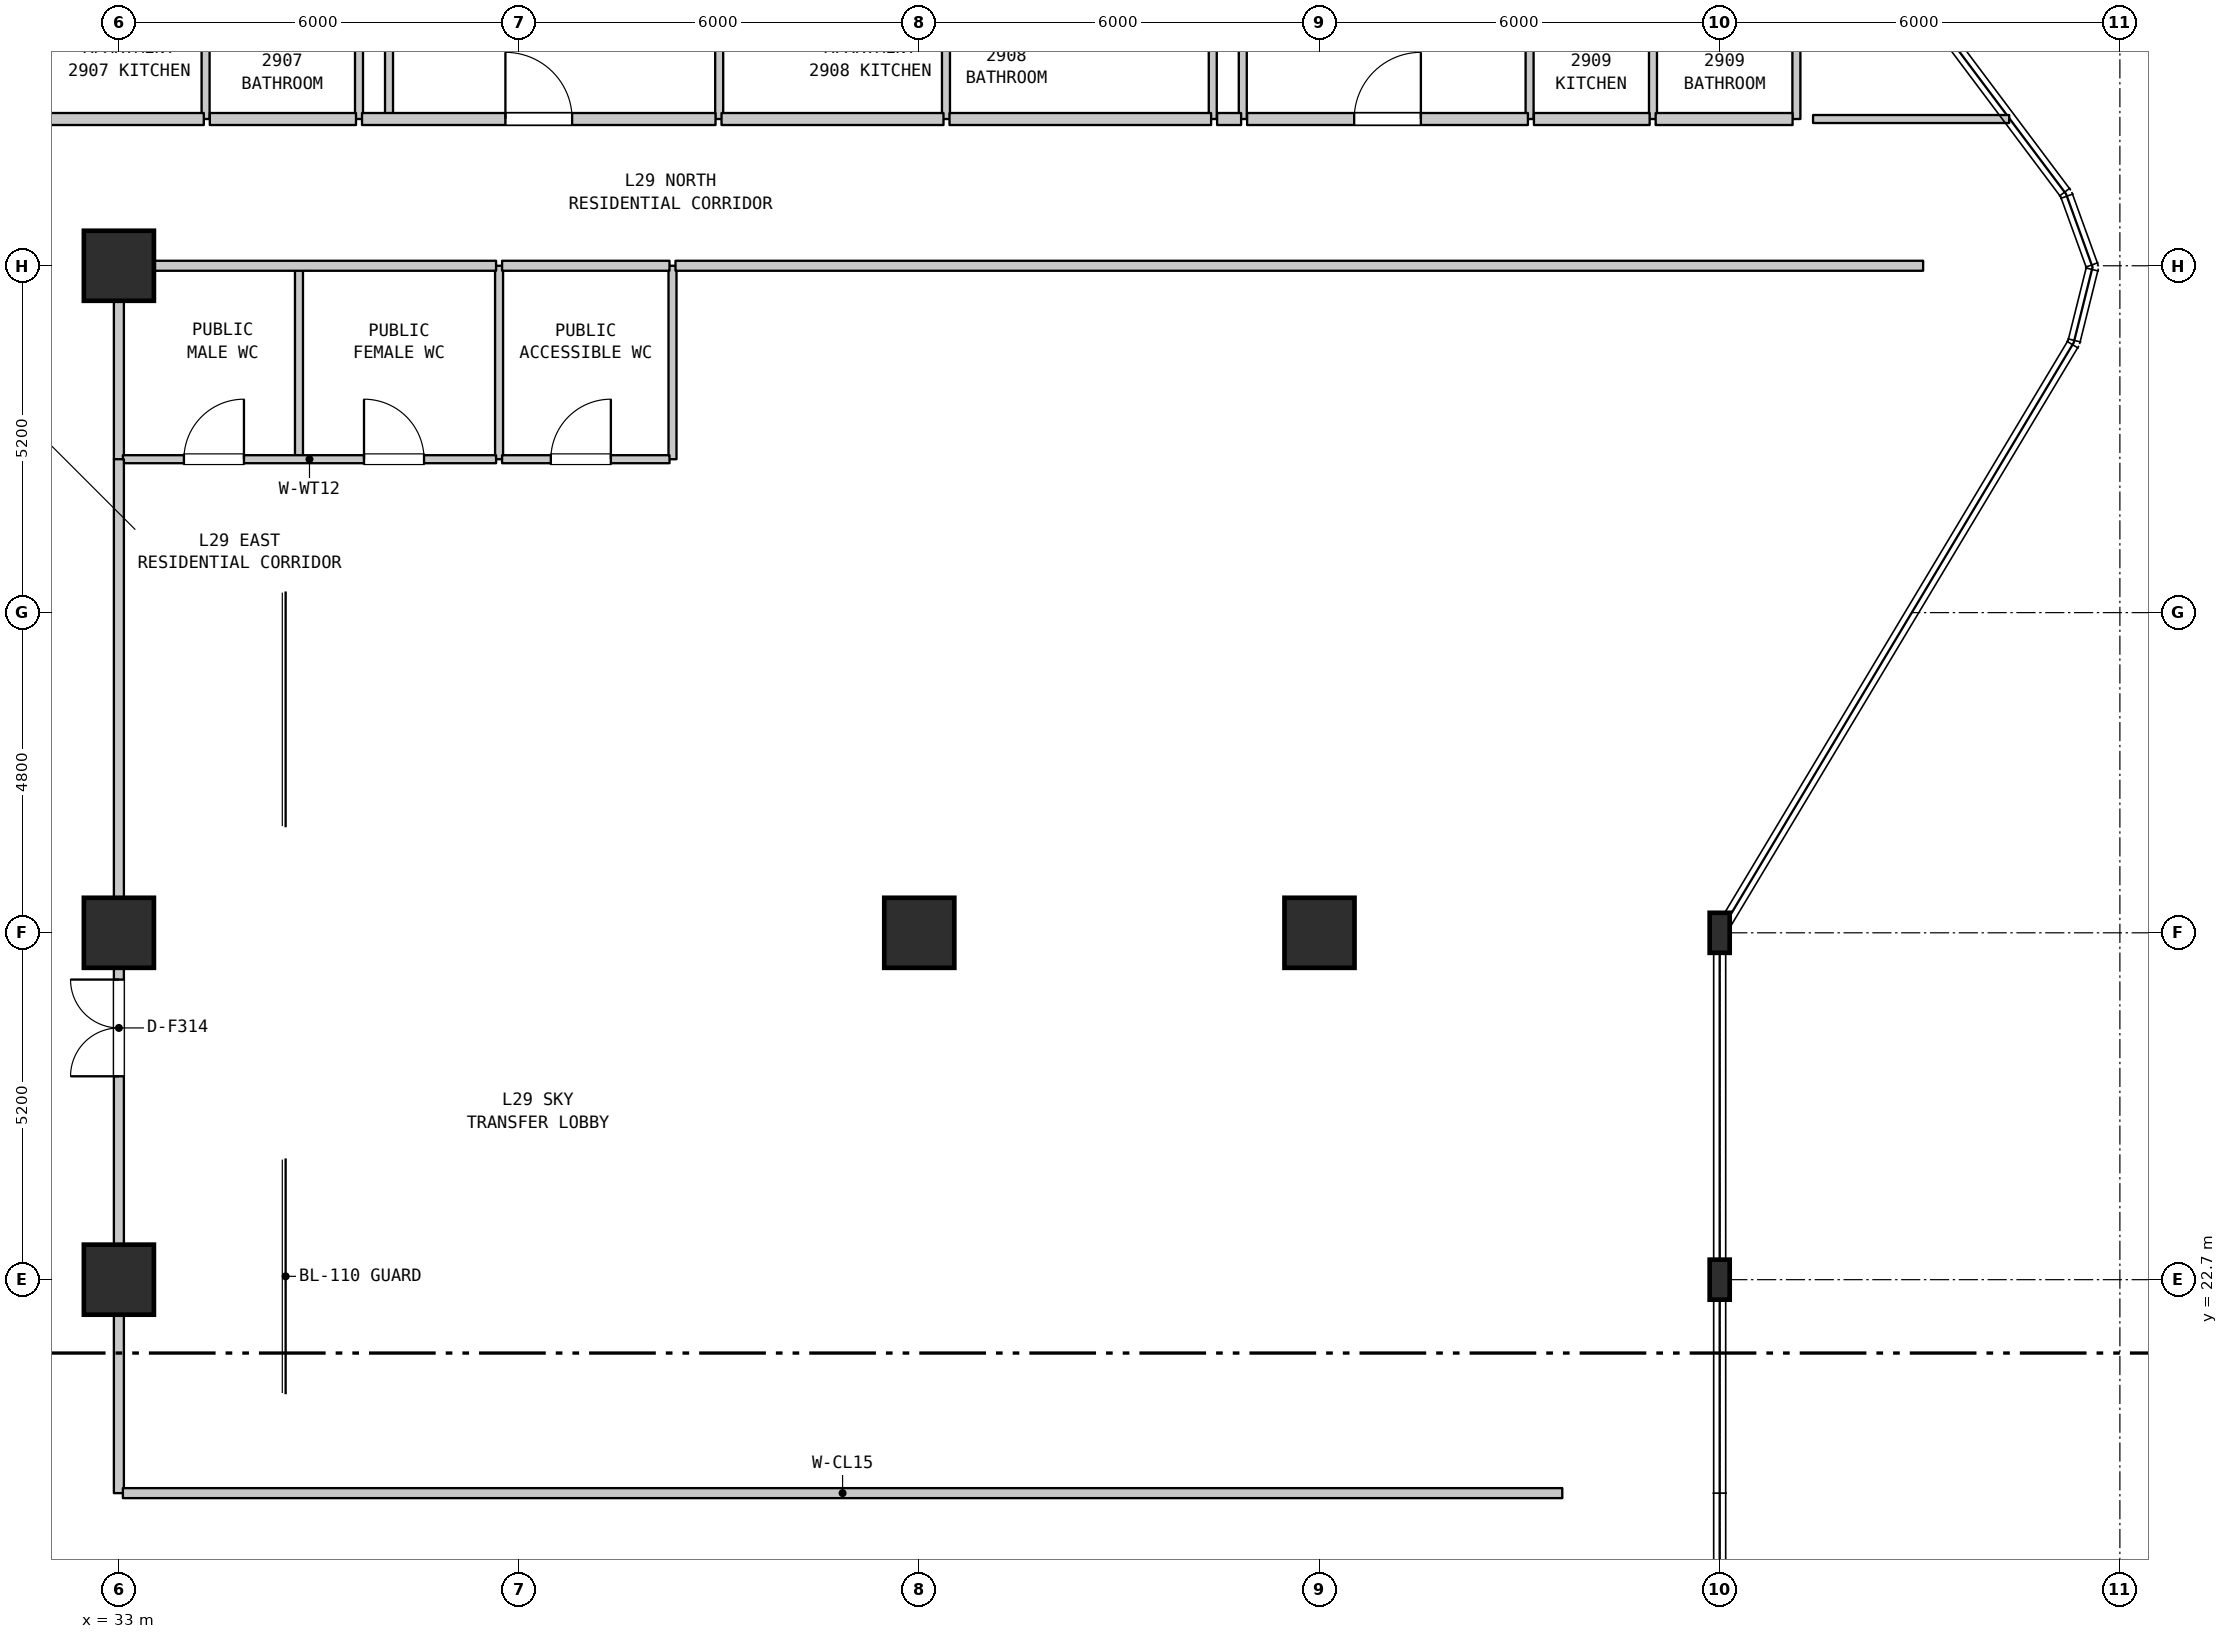
"""IFC4 building model, lengths in metres.
Left out: names, types, materials, properties, quantities, classifications, styles, units other than length and angle.
Written with IfcOpenShell. Run it as: python <this file> out.ifc"""

import sys

from ifc_helpers import new_model, si_unit, direction, frame, frame_2d, origin, origin_2d, place, context, subcontext, project, spatial, rectangle, i_section, extrude, element, fill, save


model = new_model("IFC4")
c1 = context("Model", 3, precision=1e-05, world=origin(), true_north=direction((0.0, 1.0)))
c2 = subcontext(c1, "Body", "Model", "MODEL_VIEW")
j1 = project(units=[si_unit("LENGTHUNIT", "METRE"), si_unit("PLANEANGLEUNIT", "RADIAN")], contexts=[c1])
p1 = place(None, origin())
s1 = spatial("IfcSite", under=j1, at=p1, CompositionType="ELEMENT")
p2 = place(p1, origin())
s2 = spatial("IfcBuilding", under=s1, at=p2, CompositionType="ELEMENT")
p3 = place(p2, frame((0.0, 0.0, 120.5)))
s3 = spatial("IfcBuildingStorey", under=s2, at=p3, CompositionType="ELEMENT", Elevation=120.5)
for number, where, z_axis, x_axis in (
    (1, (33.0, 22.7, 0.0), (0.0, 0.0, 1.0), (1.0, 0.0, 0.0)),
    (2, (33.0, 27.9, 0.0), (0.0, 0.0, 1.0), (1.0, 0.0, 0.0)),
    (3, (33.0, 37.9, 0.0), (0.0, 0.0, 1.0), (1.0, 0.0, 0.0)),
    (4, (45.0, 27.9, 0.0), (0.0, 0.0, 1.0), (1.0, 0.0, 0.0)),
    (5, (51.0, 27.9, 0.0), (0.0, 0.0, 1.0), (1.0, 0.0, 0.0)),
):
    element("IfcColumn", number, at=place(p3, frame(where, z_axis=z_axis, x_axis=x_axis)), inside=s3, PredefinedType="COLUMN", context=c2, shape_type="SweptSolid", body=[
        extrude(rectangle(XDim=1.05, YDim=1.05, at=origin_2d()), origin(), (0.0, 0.0, 1.0), 4.8),
    ])
for number, where, z_axis, x_axis in (
    (6, (57.0, 22.7, 0.0), (0.0, 0.0, 1.0), (1.0, 0.0, 0.0)),
    (7, (57.0, 27.9, 0.0), (0.0, 0.0, 1.0), (1.0, 0.0, 0.0)),
):
    element("IfcColumn", number, at=place(p3, frame(where, z_axis=z_axis, x_axis=x_axis)), inside=s3, PredefinedType="COLUMN", context=c2, shape_type="SweptSolid", body=[
        extrude(i_section(OverallWidth=0.3, OverallDepth=0.6, WebThickness=0.015, FlangeThickness=0.03, FilletRadius=0.027, at=origin_2d()), origin(), (0.0, 0.0, 1.0), 4.8),
    ])
p4 = place(p3, frame((33.0, 19.5, 0.0), z_axis=(0.0, 0.0, 1.0), x_axis=(0.0, 1.0, 0.0)))
e8 = element("IfcWall", 8, at=p4, inside=s3, PredefinedType="STANDARD", context=c2, shape_type="SweptSolid", body=[
    extrude(rectangle(XDim=8.4, YDim=0.15, at=frame_2d((4.2, 0.0))), origin(), (0.0, 0.0, 1.0), 4.03),
])
p5 = place(p4, frame((6.249, 0.0, 0.0)))
e9 = element("IfcOpeningElement", 9, at=p5, cuts=e8, PredefinedType="OPENING", context=c2, shape_type="SweptSolid", body=[
    extrude(rectangle(XDim=1.45, YDim=2.2, at=frame_2d((0.725, 1.1))), frame((0.0, 0.085, 0.0), z_axis=(0.0, -1.0, 0.0), x_axis=(1.0, 0.0, 0.0)), (0.0, 0.0, 1.0), 0.17),
])
p6 = place(p3, frame((33.0, 35.0, 0.0), z_axis=(0.0, 0.0, 1.0), x_axis=(0.0, 1.0, 0.0)))
e10 = element("IfcWall", 10, at=p6, inside=s3, PredefinedType="STANDARD", context=c2, shape_type="SweptSolid", body=[
    extrude(rectangle(XDim=2.9, YDim=0.15, at=frame_2d((1.45, 0.0))), origin(), (0.0, 0.0, 1.0), 3.98),
])
p7 = place(p3, frame((34.3, 40.1, 0.0), z_axis=(0.0, 0.0, 1.0), x_axis=(0.0, 1.0, 0.0)))
e11 = element("IfcWall", 11, at=p7, inside=s3, PredefinedType="PARTITIONING", context=c2, shape_type="SweptSolid", body=[
    extrude(rectangle(XDim=2.3, YDim=0.12, at=frame_2d((1.15, 0.0))), origin(), (0.0, 0.0, 1.0), 4.48),
])
p8 = place(p3, frame((35.7, 35.0, 0.0), z_axis=(0.0, 0.0, 1.0), x_axis=(0.0, 1.0, 0.0)))
e12 = element("IfcWall", 12, at=p8, inside=s3, PredefinedType="PARTITIONING", context=c2, shape_type="SweptSolid", body=[
    extrude(rectangle(XDim=2.9, YDim=0.12, at=frame_2d((1.45, 0.0))), origin(), (0.0, 0.0, 1.0), 4.48),
])
p9 = place(p3, frame((36.6, 40.1, 0.0), z_axis=(0.0, 0.0, 1.0), x_axis=(0.0, 1.0, 0.0)))
e13 = element("IfcWall", 13, at=p9, inside=s3, PredefinedType="PARTITIONING", context=c2, shape_type="SweptSolid", body=[
    extrude(rectangle(XDim=2.3, YDim=0.12, at=frame_2d((1.15, 0.0))), origin(), (0.0, 0.0, 1.0), 4.48),
])
p10 = place(p3, frame((37.05, 40.1, 0.0), z_axis=(0.0, 0.0, 1.0), x_axis=(0.0, 1.0, 0.0)))
e14 = element("IfcWall", 14, at=p10, inside=s3, PredefinedType="PARTITIONING", context=c2, shape_type="SweptSolid", body=[
    extrude(rectangle(XDim=2.05, YDim=0.12, at=frame_2d((1.025, 0.0))), origin(), (0.0, 0.0, 1.0), 4.48),
])
for number, where, z_axis, x_axis in (
    (15, (38.7, 35.0, 0.0), (0.0, 0.0, 1.0), (0.0, 1.0, 0.0)),
    (16, (41.3, 35.0, 0.0), (0.0, 0.0, 1.0), (0.0, 1.0, 0.0)),
):
    element("IfcWall", number, at=place(p3, frame(where, z_axis=z_axis, x_axis=x_axis)), inside=s3, PredefinedType="PARTITIONING", context=c2, shape_type="SweptSolid", body=[
        extrude(rectangle(XDim=2.9, YDim=0.12, at=frame_2d((1.45, 0.0))), origin(), (0.0, 0.0, 1.0), 4.48),
    ])
for number, where, z_axis, x_axis in (
    (17, (42.0, 40.1, 0.0), (0.0, 0.0, 1.0), (0.0, 1.0, 0.0)),
    (18, (45.4, 40.1, 0.0), (0.0, 0.0, 1.0), (0.0, 1.0, 0.0)),
    (19, (49.4, 40.1, 0.0), (0.0, 0.0, 1.0), (0.0, 1.0, 0.0)),
):
    element("IfcWall", number, at=place(p3, frame(where, z_axis=z_axis, x_axis=x_axis)), inside=s3, PredefinedType="PARTITIONING", context=c2, shape_type="SweptSolid", body=[
        extrude(rectangle(XDim=2.3, YDim=0.12, at=frame_2d((1.15, 0.0))), origin(), (0.0, 0.0, 1.0), 4.48),
    ])
p11 = place(p3, frame((49.85, 40.1, 0.0), z_axis=(0.0, 0.0, 1.0), x_axis=(0.0, 1.0, 0.0)))
e20 = element("IfcWall", 20, at=p11, inside=s3, PredefinedType="PARTITIONING", context=c2, shape_type="SweptSolid", body=[
    extrude(rectangle(XDim=5.35, YDim=0.12, at=frame_2d((2.675, 0.0))), origin(), (0.0, 0.0, 1.0), 4.48),
])
for number, where, z_axis, x_axis in (
    (21, (54.15, 40.1, 0.0), (0.0, 0.0, 1.0), (0.0, 1.0, 0.0)),
    (22, (56.0, 40.1, 0.0), (0.0, 0.0, 1.0), (0.0, 1.0, 0.0)),
    (23, (58.15, 40.1, 0.0), (0.0, 0.0, 1.0), (0.0, 1.0, 0.0)),
):
    element("IfcWall", number, at=place(p3, frame(where, z_axis=z_axis, x_axis=x_axis)), inside=s3, PredefinedType="PARTITIONING", context=c2, shape_type="SweptSolid", body=[
        extrude(rectangle(XDim=2.3, YDim=0.12, at=frame_2d((1.15, 0.0))), origin(), (0.0, 0.0, 1.0), 4.48),
    ])
p12 = place(p3, frame((33.06, 19.5, 0.0), z_axis=(0.0, 0.0, 1.0), x_axis=(1.0, 0.0, 0.0)))
e24 = element("IfcWall", 24, at=p12, inside=s3, PredefinedType="STANDARD", context=c2, shape_type="SweptSolid", body=[
    extrude(rectangle(XDim=21.58, YDim=0.15, at=frame_2d((10.79, 0.0))), origin(), (0.0, 0.0, 1.0), 4.48),
])
p13 = place(p3, frame((33.06, 35.0, 0.0), z_axis=(0.0, 0.0, 1.0), x_axis=(1.0, 0.0, 0.0)))
e25 = element("IfcWall", 25, at=p13, inside=s3, PredefinedType="PARTITIONING", context=c2, shape_type="SweptSolid", body=[
    extrude(rectangle(XDim=5.595, YDim=0.12, at=frame_2d((2.797, 0.0))), origin(), (0.0, 0.0, 1.0), 4.48),
])
p14 = place(p13, frame((0.915, 0.0, 0.0)))
e26 = element("IfcOpeningElement", 26, at=p14, cuts=e25, PredefinedType="OPENING", context=c2, shape_type="SweptSolid", body=[
    extrude(rectangle(XDim=0.9, YDim=2.1, at=frame_2d((0.45, 1.05))), frame((0.0, 0.07, 0.0), z_axis=(0.0, -1.0, 0.0), x_axis=(1.0, 0.0, 0.0)), (0.0, 0.0, 1.0), 0.14),
])
p15 = place(p13, frame((3.615, 0.0, 0.0)))
e27 = element("IfcOpeningElement", 27, at=p15, cuts=e25, PredefinedType="OPENING", context=c2, shape_type="SweptSolid", body=[
    extrude(rectangle(XDim=0.9, YDim=2.1, at=frame_2d((0.45, 1.05))), frame((0.0, 0.07, 0.0), z_axis=(0.0, -1.0, 0.0), x_axis=(1.0, 0.0, 0.0)), (0.0, 0.0, 1.0), 0.14),
])
p16 = place(p3, frame((38.745, 35.0, 0.0), z_axis=(0.0, 0.0, 1.0), x_axis=(1.0, 0.0, 0.0)))
e28 = element("IfcWall", 28, at=p16, inside=s3, PredefinedType="PARTITIONING", context=c2, shape_type="SweptSolid", body=[
    extrude(rectangle(XDim=2.51, YDim=0.12, at=frame_2d((1.255, 0.0))), origin(), (0.0, 0.0, 1.0), 4.48),
])
p17 = place(p16, frame((0.731, 0.0, 0.0)))
e29 = element("IfcOpeningElement", 29, at=p17, cuts=e28, PredefinedType="OPENING", context=c2, shape_type="SweptSolid", body=[
    extrude(rectangle(XDim=0.9, YDim=2.1, at=frame_2d((0.45, 1.05))), frame((0.0, 0.07, 0.0), z_axis=(0.0, -1.0, 0.0), x_axis=(1.0, 0.0, 0.0)), (0.0, 0.0, 1.0), 0.14),
])
p18 = place(p3, frame((33.06, 37.9, 0.0), z_axis=(0.0, 0.0, 1.0), x_axis=(1.0, 0.0, 0.0)))
e30 = element("IfcWall", 30, at=p18, inside=s3, PredefinedType="STANDARD", context=c2, shape_type="SweptSolid", body=[
    extrude(rectangle(XDim=5.595, YDim=0.15, at=frame_2d((2.797, 0.0))), origin(), (0.0, 0.0, 1.0), 4.48),
])
p19 = place(p3, frame((38.745, 37.9, 0.0), z_axis=(0.0, 0.0, 1.0), x_axis=(1.0, 0.0, 0.0)))
e31 = element("IfcWall", 31, at=p19, inside=s3, PredefinedType="STANDARD", context=c2, shape_type="SweptSolid", body=[
    extrude(rectangle(XDim=2.51, YDim=0.15, at=frame_2d((1.255, 0.0))), origin(), (0.0, 0.0, 1.0), 4.48),
])
p20 = place(p3, frame((41.345, 37.9, 0.0), z_axis=(0.0, 0.0, 1.0), x_axis=(1.0, 0.0, 0.0)))
e32 = element("IfcWall", 32, at=p20, inside=s3, PredefinedType="STANDARD", context=c2, shape_type="SweptSolid", body=[
    extrude(rectangle(XDim=18.705, YDim=0.15, at=frame_2d((9.353, 0.0))), origin(), (0.0, 0.0, 1.0), 4.48),
])
p21 = place(p3, frame((30.924, 40.1, 0.0), z_axis=(0.0, 0.0, 1.0), x_axis=(1.0, 0.0, 0.0)))
e33 = element("IfcWall", 33, at=p21, inside=s3, PredefinedType="STANDARD", context=c2, shape_type="SweptSolid", body=[
    extrude(rectangle(XDim=3.349, YDim=0.18, at=frame_2d((1.674, 0.0))), origin(), (0.0, 0.0, 1.0), 4.48),
])
p22 = place(p3, frame((34.363, 40.1, 0.0), z_axis=(0.0, 0.0, 1.0), x_axis=(1.0, 0.0, 0.0)))
e34 = element("IfcWall", 34, at=p22, inside=s3, PredefinedType="STANDARD", context=c2, shape_type="SweptSolid", body=[
    extrude(rectangle(XDim=2.192, YDim=0.18, at=frame_2d((1.096, 0.0))), origin(), (0.0, 0.0, 1.0), 4.48),
])
p23 = place(p3, frame((36.645, 40.1, 0.0), z_axis=(0.0, 0.0, 1.0), x_axis=(1.0, 0.0, 0.0)))
e35 = element("IfcWall", 35, at=p23, inside=s3, PredefinedType="STANDARD", context=c2, shape_type="SweptSolid", body=[
    extrude(rectangle(XDim=5.3, YDim=0.18, at=frame_2d((2.65, 0.0))), origin(), (0.0, 0.0, 1.0), 4.48),
])
p24 = place(p23, frame((2.15, 0.0, 0.0)))
e36 = element("IfcOpeningElement", 36, at=p24, cuts=e35, PredefinedType="OPENING", context=c2, shape_type="SweptSolid", body=[
    extrude(rectangle(XDim=1.0, YDim=2.15, at=frame_2d((0.5, 1.075))), frame((0.0, 0.1, 0.0), z_axis=(0.0, -1.0, 0.0), x_axis=(1.0, 0.0, 0.0)), (0.0, 0.0, 1.0), 0.2),
])
p25 = place(p3, frame((42.035, 40.1, 0.0), z_axis=(0.0, 0.0, 1.0), x_axis=(1.0, 0.0, 0.0)))
e37 = element("IfcWall", 37, at=p25, inside=s3, PredefinedType="STANDARD", context=c2, shape_type="SweptSolid", body=[
    extrude(rectangle(XDim=3.328, YDim=0.18, at=frame_2d((1.664, 0.0))), origin(), (0.0, 0.0, 1.0), 4.48),
])
p26 = place(p3, frame((45.453, 40.1, 0.0), z_axis=(0.0, 0.0, 1.0), x_axis=(1.0, 0.0, 0.0)))
e38 = element("IfcWall", 38, at=p26, inside=s3, PredefinedType="STANDARD", context=c2, shape_type="SweptSolid", body=[
    extrude(rectangle(XDim=3.922, YDim=0.18, at=frame_2d((1.961, 0.0))), origin(), (0.0, 0.0, 1.0), 4.48),
])
p27 = place(p3, frame((49.465, 40.1, 0.0), z_axis=(0.0, 0.0, 1.0), x_axis=(1.0, 0.0, 0.0)))
e39 = element("IfcWall", 39, at=p27, inside=s3, PredefinedType="STANDARD", context=c2, shape_type="SweptSolid", body=[
    extrude(rectangle(XDim=0.36, YDim=0.18, at=frame_2d((0.18, 0.0))), origin(), (0.0, 0.0, 1.0), 4.48),
])
p28 = place(p3, frame((49.915, 40.1, 0.0), z_axis=(0.0, 0.0, 1.0), x_axis=(1.0, 0.0, 0.0)))
e40 = element("IfcWall", 40, at=p28, inside=s3, PredefinedType="STANDARD", context=c2, shape_type="SweptSolid", body=[
    extrude(rectangle(XDim=4.21, YDim=0.18, at=frame_2d((2.105, 0.0))), origin(), (0.0, 0.0, 1.0), 4.48),
])
p29 = place(p28, frame((1.605, 0.0, 0.0)))
e41 = element("IfcOpeningElement", 41, at=p29, cuts=e40, PredefinedType="OPENING", context=c2, shape_type="SweptSolid", body=[
    extrude(rectangle(XDim=1.0, YDim=2.15, at=frame_2d((0.5, 1.075))), frame((0.0, 0.1, 0.0), z_axis=(0.0, -1.0, 0.0), x_axis=(1.0, 0.0, 0.0)), (0.0, 0.0, 1.0), 0.2),
])
p30 = place(p3, frame((54.215, 40.1, 0.0), z_axis=(0.0, 0.0, 1.0), x_axis=(1.0, 0.0, 0.0)))
e42 = element("IfcWall", 42, at=p30, inside=s3, PredefinedType="STANDARD", context=c2, shape_type="SweptSolid", body=[
    extrude(rectangle(XDim=1.735, YDim=0.18, at=frame_2d((0.867, 0.0))), origin(), (0.0, 0.0, 1.0), 4.48),
])
p31 = place(p3, frame((56.04, 40.1, 0.0), z_axis=(0.0, 0.0, 1.0), x_axis=(1.0, 0.0, 0.0)))
e43 = element("IfcWall", 43, at=p31, inside=s3, PredefinedType="STANDARD", context=c2, shape_type="SweptSolid", body=[
    extrude(rectangle(XDim=2.053, YDim=0.18, at=frame_2d((1.026, 0.0))), origin(), (0.0, 0.0, 1.0), 4.48),
])
p32 = place(p3, frame((58.4, 40.1, 0.0), z_axis=(0.0, 0.0, 1.0), x_axis=(1.0, 0.0, 0.0)))
e44 = element("IfcWall", 44, at=p32, inside=s3, PredefinedType="PARTITIONING", context=c2, shape_type="SweptSolid", body=[
    extrude(rectangle(XDim=2.94, YDim=0.12, at=frame_2d((1.47, 0.0))), origin(), (0.0, 0.0, 1.0), 4.48),
])
p33 = place(p3, frame((33.0, 27.9, 0.0), z_axis=(0.0, 0.0, 1.0), x_axis=(0.0, 1.0, 0.0)))
e45 = element("IfcWall", 45, at=p33, inside=s3, PredefinedType="STANDARD", context=c2, shape_type="SweptSolid", body=[
    extrude(rectangle(XDim=7.1, YDim=0.15, at=frame_2d((3.55, 0.0))), origin(), (0.0, 0.0, 1.0), 3.98),
])
p34 = place(p5, origin())
e46 = element("IfcDoor", 46, at=p34, inside=s3, OperationType="DOUBLE_DOOR_SINGLE_SWING", PredefinedType="DOOR", context=c2, shape_type="SweptSolid", body=[
    extrude(rectangle(XDim=1.45, YDim=2.2, at=frame_2d((0.725, 1.1))), frame((0.0, 0.025, 0.0), z_axis=(0.0, -1.0, 0.0), x_axis=(1.0, 0.0, 0.0)), (0.0, 0.0, 1.0), 0.05),
])
fill(e9, e46)
p35 = place(p14, origin())
e47 = element("IfcDoor", 47, at=p35, inside=s3, OperationType="SINGLE_SWING_RIGHT", PredefinedType="DOOR", context=c2, shape_type="SweptSolid", body=[
    extrude(rectangle(XDim=0.9, YDim=2.1, at=frame_2d((0.45, 1.05))), frame((0.0, 0.025, 0.0), z_axis=(0.0, -1.0, 0.0), x_axis=(1.0, 0.0, 0.0)), (0.0, 0.0, 1.0), 0.05),
])
fill(e26, e47)
p36 = place(p15, origin())
e48 = element("IfcDoor", 48, at=p36, inside=s3, OperationType="SINGLE_SWING_LEFT", PredefinedType="DOOR", context=c2, shape_type="SweptSolid", body=[
    extrude(rectangle(XDim=0.9, YDim=2.1, at=frame_2d((0.45, 1.05))), frame((0.0, 0.025, 0.0), z_axis=(0.0, -1.0, 0.0), x_axis=(1.0, 0.0, 0.0)), (0.0, 0.0, 1.0), 0.05),
])
fill(e27, e48)
p37 = place(p17, origin())
e49 = element("IfcDoor", 49, at=p37, inside=s3, OperationType="SINGLE_SWING_RIGHT", PredefinedType="DOOR", context=c2, shape_type="SweptSolid", body=[
    extrude(rectangle(XDim=0.9, YDim=2.1, at=frame_2d((0.45, 1.05))), frame((0.0, 0.025, 0.0), z_axis=(0.0, -1.0, 0.0), x_axis=(1.0, 0.0, 0.0)), (0.0, 0.0, 1.0), 0.05),
])
fill(e29, e49)
p38 = place(p24, origin())
e50 = element("IfcDoor", 50, at=p38, inside=s3, OperationType="SINGLE_SWING_LEFT", PredefinedType="DOOR", context=c2, shape_type="SweptSolid", body=[
    extrude(rectangle(XDim=1.0, YDim=2.15, at=frame_2d((0.5, 1.075))), frame((0.0, 0.025, 0.0), z_axis=(0.0, -1.0, 0.0), x_axis=(1.0, 0.0, 0.0)), (0.0, 0.0, 1.0), 0.05),
])
fill(e36, e50)
p39 = place(p29, origin())
e51 = element("IfcDoor", 51, at=p39, inside=s3, OperationType="SINGLE_SWING_RIGHT", PredefinedType="DOOR", context=c2, shape_type="SweptSolid", body=[
    extrude(rectangle(XDim=1.0, YDim=2.15, at=frame_2d((0.5, 1.075))), frame((0.0, 0.025, 0.0), z_axis=(0.0, -1.0, 0.0), x_axis=(1.0, 0.0, 0.0)), (0.0, 0.0, 1.0), 0.05),
])
fill(e41, e51)
save(model, sys.argv[1])
